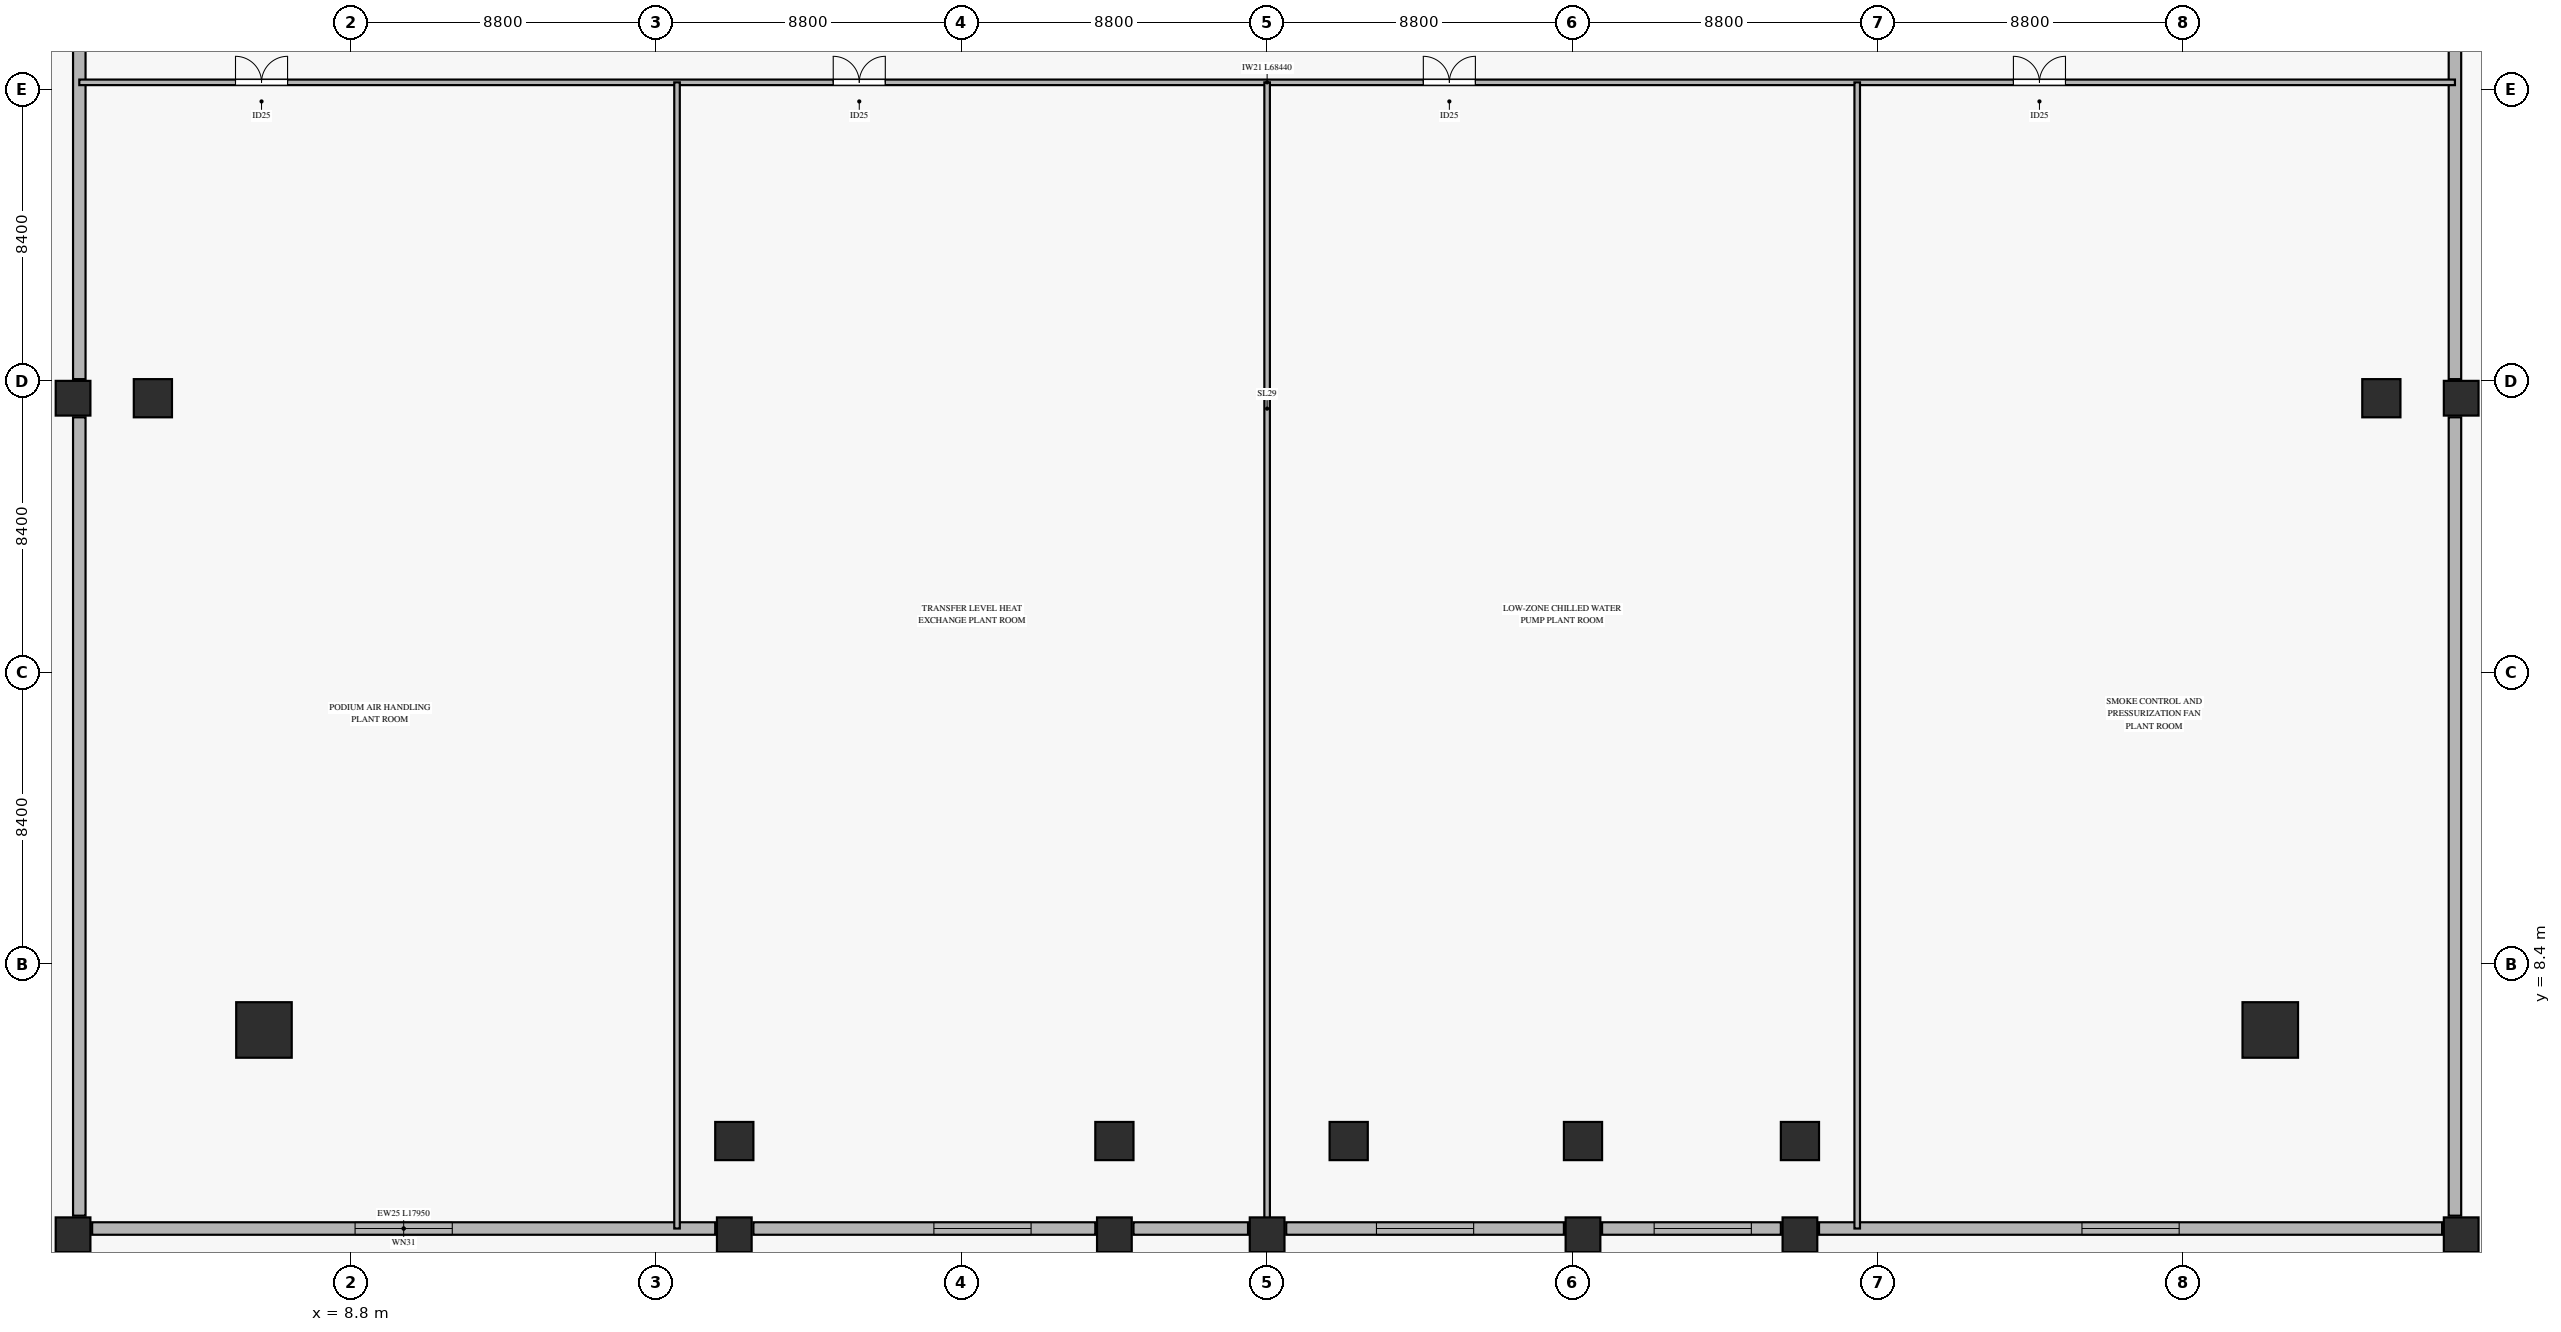
"""IFC4 building model, lengths in metres.
Left out: names, types, materials, properties, quantities, classifications, styles, units other than length and angle.
Written with IfcOpenShell. Run it as: python <this file> out.ifc"""

import sys

from ifc_helpers import new_model, si_unit, direction, frame, frame_2d, origin, origin_2d, place, context, subcontext, project, spatial, rectangle, hollow_rectangle, extrude, source, transform, mapped, element, fill, save


model = new_model("IFC4")
c1 = context("Model", 3, precision=1e-05, world=origin(), true_north=direction((0.0, 1.0)))
c2 = subcontext(c1, "Body", "Model", "MODEL_VIEW")
j1 = project(units=[si_unit("LENGTHUNIT", "METRE"), si_unit("PLANEANGLEUNIT", "RADIAN")], contexts=[c1])
p1 = place(None, origin())
s1 = spatial("IfcSite", under=j1, at=p1, CompositionType="ELEMENT")
p2 = place(p1, origin())
s2 = spatial("IfcBuilding", under=s1, at=p2, CompositionType="ELEMENT")
p3 = place(p2, frame((0.0, 0.0, 20.2)))
s3 = spatial("IfcBuildingStorey", under=s2, at=p3, CompositionType="ELEMENT", Elevation=20.2)
m1 = source(origin(), c2, "Body", "SweptSolid", [
    extrude(hollow_rectangle(XDim=1.6, YDim=1.6, WallThickness=0.075, at=origin_2d()), origin(), (0.0, 0.0, 1.0), 4.98),
])
for number, where, z_axis, x_axis in (
    (1, (6.3, 6.5, 0.0), (0.0, 0.0, 1.0), (1.0, 0.0, 0.0)),
    (2, (64.1, 6.5, 0.0), (0.0, 0.0, 1.0), (1.0, 0.0, 0.0)),
):
    element("IfcColumn", number, at=place(p3, frame(where, z_axis=z_axis, x_axis=x_axis)), inside=s3, PredefinedType="COLUMN", context=c2, shape_type="MappedRepresentation", body=[
        mapped(m1, transform((0.0, 0.0, 0.0), x_axis=(1.0, 0.0, 0.0), y_axis=(0.0, 1.0, 0.0), z_axis=(0.0, 0.0, 1.0), scale=1.0)),
    ])
m2 = source(origin(), c2, "Body", "SweptSolid", [
    extrude(hollow_rectangle(XDim=1.1, YDim=1.1, WallThickness=0.05, at=origin_2d()), origin(), (0.0, 0.0, 1.0), 4.98),
])
for number, where, z_axis, x_axis in (
    (3, (19.85, 3.3, 0.0), (0.0, 0.0, 1.0), (1.0, 0.0, 0.0)),
    (4, (30.8, 3.3, 0.0), (0.0, 0.0, 1.0), (1.0, 0.0, 0.0)),
    (5, (37.55, 3.3, 0.0), (0.0, 0.0, 1.0), (1.0, 0.0, 0.0)),
    (6, (44.3, 3.3, 0.0), (0.0, 0.0, 1.0), (1.0, 0.0, 0.0)),
    (7, (50.55, 3.3, 0.0), (0.0, 0.0, 1.0), (1.0, 0.0, 0.0)),
    (8, (3.1, 24.7, 0.0), (0.0, 0.0, 1.0), (1.0, 0.0, 0.0)),
    (9, (67.3, 24.7, 0.0), (0.0, 0.0, 1.0), (1.0, 0.0, 0.0)),
):
    element("IfcColumn", number, at=place(p3, frame(where, z_axis=z_axis, x_axis=x_axis)), inside=s3, PredefinedType="COLUMN", context=c2, shape_type="MappedRepresentation", body=[
        mapped(m2, transform((0.0, 0.0, 0.0), x_axis=(1.0, 0.0, 0.0), y_axis=(0.0, 1.0, 0.0), z_axis=(0.0, 0.0, 1.0), scale=1.0)),
    ])
m3 = source(origin(), c2, "Body", "SweptSolid", [
    extrude(hollow_rectangle(XDim=1.0, YDim=1.0, WallThickness=0.045, at=origin_2d()), origin(), (0.0, 0.0, 1.0), 4.98),
])
for number, where, z_axis, x_axis in (
    (10, (0.8, 0.6, 0.0), (0.0, 0.0, 1.0), (1.0, 0.0, 0.0)),
    (11, (19.85, 0.6, 0.0), (0.0, 0.0, 1.0), (1.0, 0.0, 0.0)),
    (12, (30.8, 0.6, 0.0), (0.0, 0.0, 1.0), (1.0, 0.0, 0.0)),
    (13, (35.2, 0.6, 0.0), (0.0, 0.0, 1.0), (1.0, 0.0, 0.0)),
    (14, (44.3, 0.6, 0.0), (0.0, 0.0, 1.0), (1.0, 0.0, 0.0)),
    (15, (50.55, 0.6, 0.0), (0.0, 0.0, 1.0), (1.0, 0.0, 0.0)),
    (16, (69.6, 0.6, 0.0), (0.0, 0.0, 1.0), (1.0, 0.0, 0.0)),
    (17, (0.8, 24.7, 0.0), (0.0, 0.0, 1.0), (1.0, 0.0, 0.0)),
    (18, (69.6, 24.7, 0.0), (0.0, 0.0, 1.0), (1.0, 0.0, 0.0)),
):
    element("IfcColumn", number, at=place(p3, frame(where, z_axis=z_axis, x_axis=x_axis)), inside=s3, PredefinedType="COLUMN", context=c2, shape_type="MappedRepresentation", body=[
        mapped(m3, transform((0.0, 0.0, 0.0), x_axis=(1.0, 0.0, 0.0), y_axis=(0.0, 1.0, 0.0), z_axis=(0.0, 0.0, 1.0), scale=1.0)),
    ])
p4 = place(p3, frame((1.35, 0.78, 0.0), z_axis=(0.0, 0.0, 1.0), x_axis=(1.0, 0.0, 0.0)))
e19 = element("IfcWall", 19, at=p4, inside=s3, PredefinedType="SOLIDWALL", context=c2, shape_type="SweptSolid", body=[
    extrude(rectangle(XDim=17.95, YDim=0.36, at=frame_2d((8.975, 0.0))), origin(), (0.0, 0.0, 1.0), 3.56),
])
p5 = place(p4, frame((7.575, 0.0, 0.72)))
e20 = element("IfcOpeningElement", 20, at=p5, cuts=e19, PredefinedType="OPENING", context=c2, shape_type="SweptSolid", body=[
    extrude(rectangle(XDim=2.8, YDim=2.0, at=frame_2d((1.4, 1.0))), frame((0.0, 0.19, 0.0), z_axis=(0.0, -1.0, 0.0), x_axis=(1.0, 0.0, 0.0)), (0.0, 0.0, 1.0), 0.38),
])
p6 = place(p3, frame((20.4, 0.78, 0.0), z_axis=(0.0, 0.0, 1.0), x_axis=(1.0, 0.0, 0.0)))
e21 = element("IfcWall", 21, at=p6, inside=s3, PredefinedType="SOLIDWALL", context=c2, shape_type="SweptSolid", body=[
    extrude(rectangle(XDim=9.85, YDim=0.36, at=frame_2d((4.925, 0.0))), origin(), (0.0, 0.0, 1.0), 3.56),
])
p7 = place(p6, frame((5.2, 0.0, 0.72)))
e22 = element("IfcOpeningElement", 22, at=p7, cuts=e21, PredefinedType="OPENING", context=c2, shape_type="SweptSolid", body=[
    extrude(rectangle(XDim=2.8, YDim=2.0, at=frame_2d((1.4, 1.0))), frame((0.0, 0.19, 0.0), z_axis=(0.0, -1.0, 0.0), x_axis=(1.0, 0.0, 0.0)), (0.0, 0.0, 1.0), 0.38),
])
p8 = place(p3, frame((31.35, 0.78, 0.0), z_axis=(0.0, 0.0, 1.0), x_axis=(1.0, 0.0, 0.0)))
e23 = element("IfcWall", 23, at=p8, inside=s3, PredefinedType="SOLIDWALL", context=c2, shape_type="SweptSolid", body=[
    extrude(rectangle(XDim=3.3, YDim=0.36, at=frame_2d((1.65, 0.0))), origin(), (0.0, 0.0, 1.0), 3.56),
])
p9 = place(p3, frame((35.75, 0.78, 0.0), z_axis=(0.0, 0.0, 1.0), x_axis=(1.0, 0.0, 0.0)))
e24 = element("IfcWall", 24, at=p9, inside=s3, PredefinedType="SOLIDWALL", context=c2, shape_type="SweptSolid", body=[
    extrude(rectangle(XDim=8.0, YDim=0.36, at=frame_2d((4.0, 0.0))), origin(), (0.0, 0.0, 1.0), 3.56),
])
p10 = place(p9, frame((2.6, 0.0, 0.72)))
e25 = element("IfcOpeningElement", 25, at=p10, cuts=e24, PredefinedType="OPENING", context=c2, shape_type="SweptSolid", body=[
    extrude(rectangle(XDim=2.8, YDim=2.0, at=frame_2d((1.4, 1.0))), frame((0.0, 0.19, 0.0), z_axis=(0.0, -1.0, 0.0), x_axis=(1.0, 0.0, 0.0)), (0.0, 0.0, 1.0), 0.38),
])
p11 = place(p3, frame((44.85, 0.78, 0.0), z_axis=(0.0, 0.0, 1.0), x_axis=(1.0, 0.0, 0.0)))
e26 = element("IfcWall", 26, at=p11, inside=s3, PredefinedType="SOLIDWALL", context=c2, shape_type="SweptSolid", body=[
    extrude(rectangle(XDim=5.15, YDim=0.36, at=frame_2d((2.575, 0.0))), origin(), (0.0, 0.0, 1.0), 3.56),
])
p12 = place(p11, frame((1.5, 0.0, 0.72)))
e27 = element("IfcOpeningElement", 27, at=p12, cuts=e26, PredefinedType="OPENING", context=c2, shape_type="SweptSolid", body=[
    extrude(rectangle(XDim=2.8, YDim=2.0, at=frame_2d((1.4, 1.0))), frame((0.0, 0.19, 0.0), z_axis=(0.0, -1.0, 0.0), x_axis=(1.0, 0.0, 0.0)), (0.0, 0.0, 1.0), 0.38),
])
p13 = place(p3, frame((51.1, 0.78, 0.0), z_axis=(0.0, 0.0, 1.0), x_axis=(1.0, 0.0, 0.0)))
e28 = element("IfcWall", 28, at=p13, inside=s3, PredefinedType="SOLIDWALL", context=c2, shape_type="SweptSolid", body=[
    extrude(rectangle(XDim=17.95, YDim=0.36, at=frame_2d((8.975, 0.0))), origin(), (0.0, 0.0, 1.0), 3.56),
])
p14 = place(p13, frame((7.575, 0.0, 0.72)))
e29 = element("IfcOpeningElement", 29, at=p14, cuts=e28, PredefinedType="OPENING", context=c2, shape_type="SweptSolid", body=[
    extrude(rectangle(XDim=2.8, YDim=2.0, at=frame_2d((1.4, 1.0))), frame((0.0, 0.19, 0.0), z_axis=(0.0, -1.0, 0.0), x_axis=(1.0, 0.0, 0.0)), (0.0, 0.0, 1.0), 0.38),
])
p15 = place(p3, frame((0.98, 1.15, 0.0), z_axis=(0.0, 0.0, 1.0), x_axis=(0.0, 1.0, 0.0)))
e30 = element("IfcWall", 30, at=p15, inside=s3, PredefinedType="SOLIDWALL", context=c2, shape_type="SweptSolid", body=[
    extrude(rectangle(XDim=23.0, YDim=0.36, at=frame_2d((11.5, 0.0))), origin(), (0.0, 0.0, 1.0), 3.56),
])
p16 = place(p3, frame((0.98, 25.25, 0.0), z_axis=(0.0, 0.0, 1.0), x_axis=(0.0, 1.0, 0.0)))
e31 = element("IfcWall", 31, at=p16, inside=s3, PredefinedType="SOLIDWALL", context=c2, shape_type="SweptSolid", body=[
    extrude(rectangle(XDim=11.65, YDim=0.36, at=frame_2d((5.825, 0.0))), origin(), (0.0, 0.0, 1.0), 3.56),
])
p17 = place(p3, frame((69.42, 1.15, 0.0), z_axis=(0.0, 0.0, 1.0), x_axis=(0.0, 1.0, 0.0)))
e32 = element("IfcWall", 32, at=p17, inside=s3, PredefinedType="SOLIDWALL", context=c2, shape_type="SweptSolid", body=[
    extrude(rectangle(XDim=23.0, YDim=0.36, at=frame_2d((11.5, 0.0))), origin(), (0.0, 0.0, 1.0), 3.56),
])
p18 = place(p3, frame((69.42, 25.25, 0.0), z_axis=(0.0, 0.0, 1.0), x_axis=(0.0, 1.0, 0.0)))
e33 = element("IfcWall", 33, at=p18, inside=s3, PredefinedType="SOLIDWALL", context=c2, shape_type="SweptSolid", body=[
    extrude(rectangle(XDim=11.65, YDim=0.36, at=frame_2d((5.825, 0.0))), origin(), (0.0, 0.0, 1.0), 3.56),
])
p19 = place(p3, frame((0.98, 33.8, 0.0), z_axis=(0.0, 0.0, 1.0), x_axis=(1.0, 0.0, 0.0)))
e34 = element("IfcWall", 34, at=p19, inside=s3, PredefinedType="PARTITIONING", context=c2, shape_type="SweptSolid", body=[
    extrude(rectangle(XDim=68.44, YDim=0.16, at=frame_2d((34.22, 0.0))), origin(), (0.0, 0.0, 1.0), 3.565),
])
p20 = place(p19, frame((4.5, 0.0, 0.0)))
e35 = element("IfcOpeningElement", 35, at=p20, cuts=e34, PredefinedType="OPENING", context=c2, shape_type="SweptSolid", body=[
    extrude(rectangle(XDim=1.5, YDim=2.2, at=frame_2d((0.75, 1.1))), frame((0.0, 0.09, 0.0), z_axis=(0.0, -1.0, 0.0), x_axis=(1.0, 0.0, 0.0)), (0.0, 0.0, 1.0), 0.18),
])
p21 = place(p19, frame((21.72, 0.0, 0.0)))
e36 = element("IfcOpeningElement", 36, at=p21, cuts=e34, PredefinedType="OPENING", context=c2, shape_type="SweptSolid", body=[
    extrude(rectangle(XDim=1.5, YDim=2.2, at=frame_2d((0.75, 1.1))), frame((0.0, 0.09, 0.0), z_axis=(0.0, -1.0, 0.0), x_axis=(1.0, 0.0, 0.0)), (0.0, 0.0, 1.0), 0.18),
])
p22 = place(p19, frame((38.72, 0.0, 0.0)))
e37 = element("IfcOpeningElement", 37, at=p22, cuts=e34, PredefinedType="OPENING", context=c2, shape_type="SweptSolid", body=[
    extrude(rectangle(XDim=1.5, YDim=2.2, at=frame_2d((0.75, 1.1))), frame((0.0, 0.09, 0.0), z_axis=(0.0, -1.0, 0.0), x_axis=(1.0, 0.0, 0.0)), (0.0, 0.0, 1.0), 0.18),
])
p23 = place(p19, frame((55.72, 0.0, 0.0)))
e38 = element("IfcOpeningElement", 38, at=p23, cuts=e34, PredefinedType="OPENING", context=c2, shape_type="SweptSolid", body=[
    extrude(rectangle(XDim=1.5, YDim=2.2, at=frame_2d((0.75, 1.1))), frame((0.0, 0.09, 0.0), z_axis=(0.0, -1.0, 0.0), x_axis=(1.0, 0.0, 0.0)), (0.0, 0.0, 1.0), 0.18),
])
for number, where, z_axis, x_axis in (
    (39, (18.2, 0.78, 0.0), (0.0, 0.0, 1.0), (0.0, 1.0, 0.0)),
    (40, (35.2, 0.78, 0.0), (0.0, 0.0, 1.0), (0.0, 1.0, 0.0)),
    (41, (52.2, 0.78, 0.0), (0.0, 0.0, 1.0), (0.0, 1.0, 0.0)),
):
    element("IfcWall", number, at=place(p3, frame(where, z_axis=z_axis, x_axis=x_axis)), inside=s3, PredefinedType="PARTITIONING", context=c2, shape_type="SweptSolid", body=[
        extrude(rectangle(XDim=33.02, YDim=0.16, at=frame_2d((16.51, 0.0))), origin(), (0.0, 0.0, 1.0), 3.565),
    ])
m4 = source(origin(), c2, "Body", "SweptSolid", [
    extrude(rectangle(XDim=2.8, YDim=2.0, at=frame_2d((1.4, 1.0))), frame((0.0, 0.03, 0.0), z_axis=(0.0, -1.0, 0.0), x_axis=(1.0, 0.0, 0.0)), (0.0, 0.0, 1.0), 0.06),
])
p24 = place(p5, origin())
e42 = element("IfcWindow", 42, at=p24, inside=s3, PartitioningType="SINGLE_PANEL", PredefinedType="WINDOW", context=c2, shape_type="MappedRepresentation", body=[
    mapped(m4, transform((0.0, 0.0, 0.0), x_axis=(1.0, 0.0, 0.0), y_axis=(0.0, 1.0, 0.0), z_axis=(0.0, 0.0, 1.0), scale=1.0)),
])
fill(e20, e42)
p25 = place(p7, origin())
e43 = element("IfcWindow", 43, at=p25, inside=s3, PartitioningType="SINGLE_PANEL", PredefinedType="WINDOW", context=c2, shape_type="MappedRepresentation", body=[
    mapped(m4, transform((0.0, 0.0, 0.0), x_axis=(1.0, 0.0, 0.0), y_axis=(0.0, 1.0, 0.0), z_axis=(0.0, 0.0, 1.0), scale=1.0)),
])
fill(e22, e43)
p26 = place(p10, origin())
e44 = element("IfcWindow", 44, at=p26, inside=s3, PartitioningType="SINGLE_PANEL", PredefinedType="WINDOW", context=c2, shape_type="MappedRepresentation", body=[
    mapped(m4, transform((0.0, 0.0, 0.0), x_axis=(1.0, 0.0, 0.0), y_axis=(0.0, 1.0, 0.0), z_axis=(0.0, 0.0, 1.0), scale=1.0)),
])
fill(e25, e44)
p27 = place(p12, origin())
e45 = element("IfcWindow", 45, at=p27, inside=s3, PartitioningType="SINGLE_PANEL", PredefinedType="WINDOW", context=c2, shape_type="MappedRepresentation", body=[
    mapped(m4, transform((0.0, 0.0, 0.0), x_axis=(1.0, 0.0, 0.0), y_axis=(0.0, 1.0, 0.0), z_axis=(0.0, 0.0, 1.0), scale=1.0)),
])
fill(e27, e45)
p28 = place(p14, origin())
e46 = element("IfcWindow", 46, at=p28, inside=s3, PartitioningType="SINGLE_PANEL", PredefinedType="WINDOW", context=c2, shape_type="MappedRepresentation", body=[
    mapped(m4, transform((0.0, 0.0, 0.0), x_axis=(1.0, 0.0, 0.0), y_axis=(0.0, 1.0, 0.0), z_axis=(0.0, 0.0, 1.0), scale=1.0)),
])
fill(e29, e46)
m5 = source(origin(), c2, "Body", "SweptSolid", [
    extrude(rectangle(XDim=1.5, YDim=2.2, at=frame_2d((0.75, 1.1))), frame((0.0, 0.025, 0.0), z_axis=(0.0, -1.0, 0.0), x_axis=(1.0, 0.0, 0.0)), (0.0, 0.0, 1.0), 0.05),
])
p29 = place(p20, origin())
e47 = element("IfcDoor", 47, at=p29, inside=s3, OperationType="DOUBLE_SWING_LEFT", PredefinedType="DOOR", context=c2, shape_type="MappedRepresentation", body=[
    mapped(m5, transform((0.0, 0.0, 0.0), x_axis=(1.0, 0.0, 0.0), y_axis=(0.0, 1.0, 0.0), z_axis=(0.0, 0.0, 1.0), scale=1.0)),
])
fill(e35, e47)
p30 = place(p21, origin())
e48 = element("IfcDoor", 48, at=p30, inside=s3, OperationType="DOUBLE_SWING_LEFT", PredefinedType="DOOR", context=c2, shape_type="MappedRepresentation", body=[
    mapped(m5, transform((0.0, 0.0, 0.0), x_axis=(1.0, 0.0, 0.0), y_axis=(0.0, 1.0, 0.0), z_axis=(0.0, 0.0, 1.0), scale=1.0)),
])
fill(e36, e48)
p31 = place(p22, origin())
e49 = element("IfcDoor", 49, at=p31, inside=s3, OperationType="DOUBLE_SWING_LEFT", PredefinedType="DOOR", context=c2, shape_type="MappedRepresentation", body=[
    mapped(m5, transform((0.0, 0.0, 0.0), x_axis=(1.0, 0.0, 0.0), y_axis=(0.0, 1.0, 0.0), z_axis=(0.0, 0.0, 1.0), scale=1.0)),
])
fill(e37, e49)
p32 = place(p23, origin())
e50 = element("IfcDoor", 50, at=p32, inside=s3, OperationType="DOUBLE_SWING_LEFT", PredefinedType="DOOR", context=c2, shape_type="MappedRepresentation", body=[
    mapped(m5, transform((0.0, 0.0, 0.0), x_axis=(1.0, 0.0, 0.0), y_axis=(0.0, 1.0, 0.0), z_axis=(0.0, 0.0, 1.0), scale=1.0)),
])
fill(e38, e50)
save(model, sys.argv[1])
